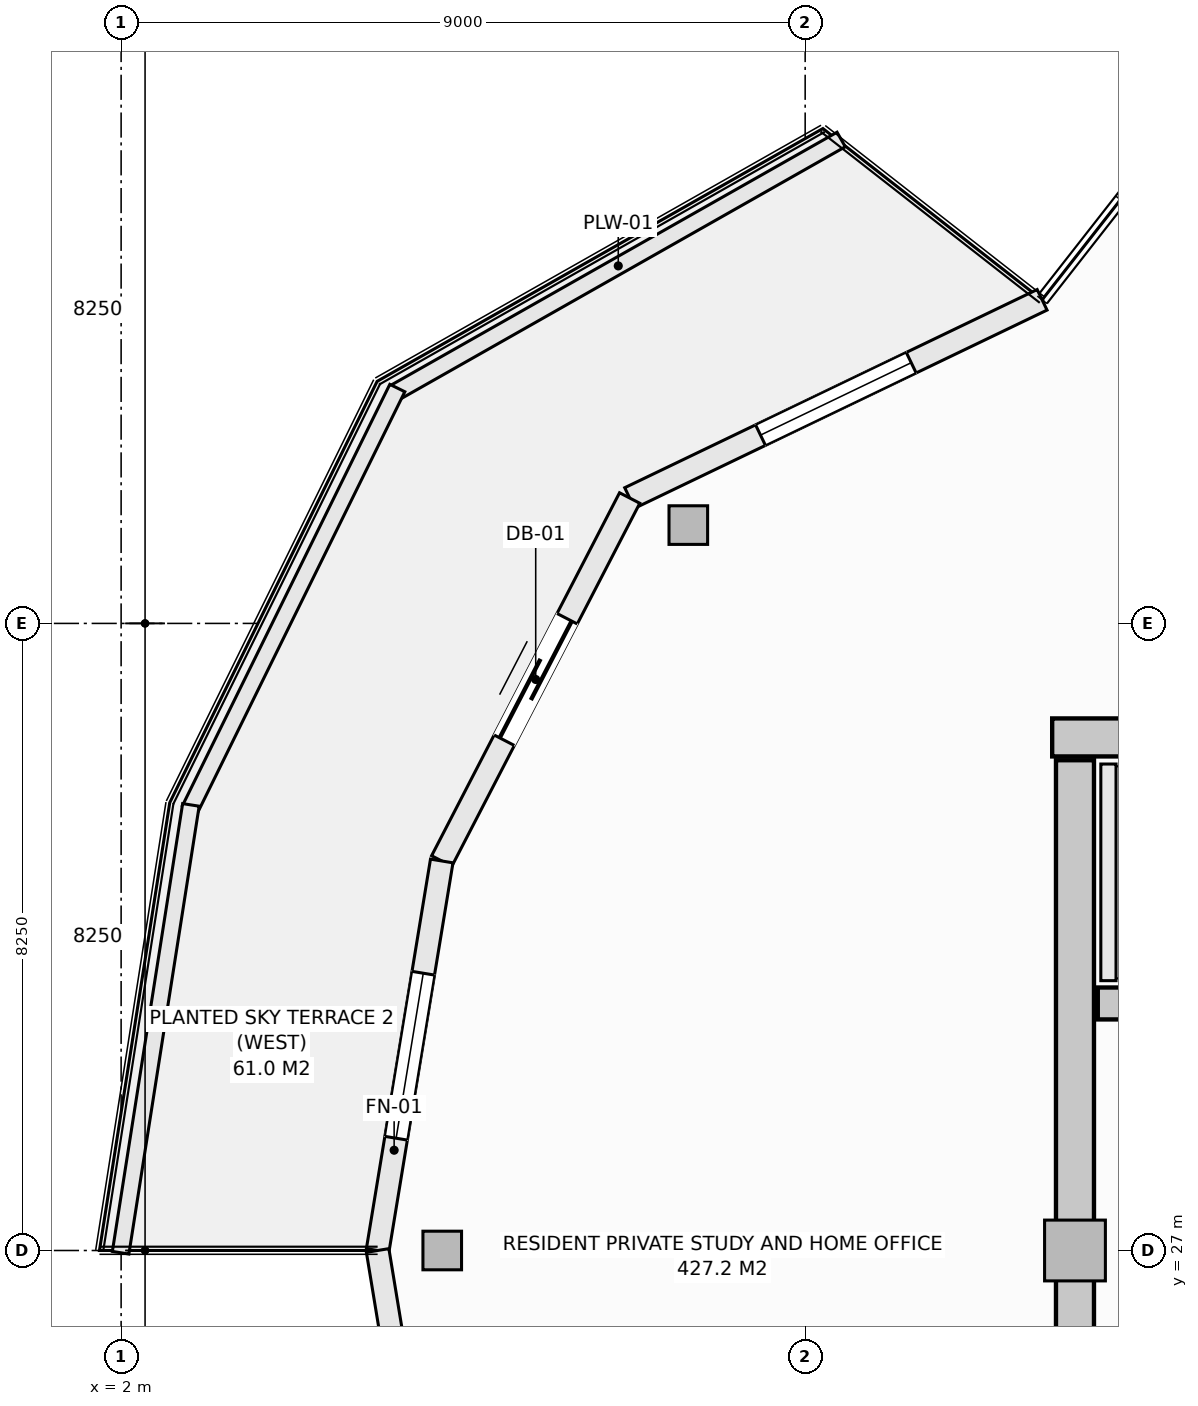
"""IFC4 building model, lengths in metres.
Left out: names, types, materials, properties, quantities, classifications, styles, units other than length and angle.
Written with IfcOpenShell. Run it as: python <this file> out.ifc"""

import sys

from ifc_helpers import new_model, si_unit, direction, frame, frame_2d, origin, origin_2d, place, context, subcontext, project, spatial, rectangle, hollow_rectangle, extrude, element, fill, save


model = new_model("IFC4")
c1 = context("Model", 3, precision=1e-05, world=origin(), true_north=direction((0.0, 1.0)))
c2 = subcontext(c1, "Body", "Model", "MODEL_VIEW")
j1 = project(units=[si_unit("LENGTHUNIT", "METRE"), si_unit("PLANEANGLEUNIT", "RADIAN")], contexts=[c1])
p1 = place(None, origin())
s1 = spatial("IfcSite", under=j1, at=p1, CompositionType="ELEMENT")
p2 = place(p1, origin())
s2 = spatial("IfcBuilding", under=s1, at=p2, CompositionType="ELEMENT")
p3 = place(p2, frame((0.0, 0.0, 199.7)))
s3 = spatial("IfcBuildingStorey", under=s2, at=p3, CompositionType="ELEMENT", Elevation=199.7)
p4 = place(p3, frame((14.25, 33.75, -0.27), z_axis=(0.0, 0.0, 1.0), x_axis=(1.0, 0.0, 0.0)))
e1 = element("IfcWall", 1, at=p4, inside=s3, PredefinedType="SHEAR", context=c2, shape_type="SweptSolid", body=[
    extrude(rectangle(XDim=13.5, YDim=0.5, at=frame_2d((6.75, 0.0))), origin(), (0.0, 0.0, 1.0), 3.3),
])
p5 = place(p3, frame((14.55, 20.55, -0.27), z_axis=(0.0, 0.0, 1.0), x_axis=(0.0, 1.0, 0.0)))
e2 = element("IfcWall", 2, at=p5, inside=s3, PredefinedType="SHEAR", context=c2, shape_type="SweptSolid", body=[
    extrude(rectangle(XDim=12.9, YDim=0.5, at=frame_2d((6.45, 0.0))), origin(), (0.0, 0.0, 1.0), 3.3),
])
p6 = place(p3, frame((14.85, 30.25, -0.27), z_axis=(0.0, 0.0, 1.0), x_axis=(1.0, 0.0, 0.0)))
e3 = element("IfcWall", 3, at=p6, inside=s3, PredefinedType="SHEAR", context=c2, shape_type="SweptSolid", body=[
    extrude(rectangle(XDim=7.3, YDim=0.42, at=frame_2d((3.65, 0.0))), origin(), (0.0, 0.0, 1.0), 3.3),
])
for number, where, z_axis, x_axis in (
    (4, (9.463, 36.544, -0.27), (0.0, 0.0, 1.0), (1.0, 0.0, 0.0)),
    (5, (6.225, 27.0, -0.27), (0.0, 0.0, 1.0), (1.0, 0.0, 0.0)),
):
    element("IfcColumn", number, at=place(p3, frame(where, z_axis=z_axis, x_axis=x_axis)), inside=s3, PredefinedType="COLUMN", context=c2, shape_type="SweptSolid", body=[
        extrude(hollow_rectangle(XDim=0.508, YDim=0.508, WallThickness=0.019, at=origin_2d()), origin(), (0.0, 0.0, 1.0), 3.3),
    ])
p7 = place(p3, frame((14.55, 27.0, -0.27), z_axis=(0.0, 0.0, 1.0), x_axis=(1.0, 0.0, 0.0)))
e6 = element("IfcColumn", 6, at=p7, inside=s3, PredefinedType="PILASTER", context=c2, shape_type="SweptSolid", body=[
    extrude(rectangle(XDim=0.8, YDim=0.8, at=origin_2d()), origin(), (0.0, 0.0, 1.0), 3.3),
])
p8 = place(p3, frame((8.691, 36.9, 0.0), z_axis=(0.0, 0.0, 1.0), x_axis=(0.901348331142, 0.433094892545, 0.0)))
e7 = element("IfcWall", 7, at=p8, inside=s3, PredefinedType="SOLIDWALL", context=c2, shape_type="SweptSolid", body=[
    extrude(rectangle(XDim=6.021, YDim=0.3, at=frame_2d((3.01, 0.0))), origin(), (0.0, 0.0, 1.0), 2.605),
])
p9 = place(p8, frame((1.91, 0.0, 0.72)))
e8 = element("IfcOpeningElement", 8, at=p9, cuts=e7, PredefinedType="OPENING", context=c2, shape_type="SweptSolid", body=[
    extrude(rectangle(XDim=2.2, YDim=1.65, at=frame_2d((1.1, 0.825))), frame((0.0, 0.16, 0.0), z_axis=(0.0, -1.0, 0.0), x_axis=(1.0, 0.0, 0.0)), (0.0, 0.0, 1.0), 0.32),
])
p10 = place(p3, frame((6.218, 32.125, 0.0), z_axis=(0.0, 0.0, 1.0), x_axis=(0.459808219482, 0.888018243786, 0.0)))
e9 = element("IfcWall", 9, at=p10, inside=s3, PredefinedType="SOLIDWALL", context=c2, shape_type="SweptSolid", body=[
    extrude(rectangle(XDim=5.378, YDim=0.3, at=frame_2d((2.689, 0.0))), origin(), (0.0, 0.0, 1.0), 2.605),
])
p11 = place(p10, frame((1.789, 0.0, 0.0)))
e10 = element("IfcOpeningElement", 10, at=p11, cuts=e9, PredefinedType="OPENING", context=c2, shape_type="SweptSolid", body=[
    extrude(rectangle(XDim=1.8, YDim=2.25, at=frame_2d((0.9, 1.125))), frame((0.0, 0.16, 0.0), z_axis=(0.0, -1.0, 0.0), x_axis=(1.0, 0.0, 0.0)), (0.0, 0.0, 1.0), 0.32),
])
p12 = place(p3, frame((5.375, 27.0, 0.0), z_axis=(0.0, 0.0, 1.0), x_axis=(0.16237087798, 0.986729799886, 0.0)))
e11 = element("IfcWall", 11, at=p12, inside=s3, PredefinedType="SOLIDWALL", context=c2, shape_type="SweptSolid", body=[
    extrude(rectangle(XDim=5.193, YDim=0.3, at=frame_2d((2.597, 0.0))), origin(), (0.0, 0.0, 1.0), 2.605),
])
p13 = place(p12, frame((1.497, 0.0, 0.72)))
e12 = element("IfcOpeningElement", 12, at=p13, cuts=e11, PredefinedType="OPENING", context=c2, shape_type="SweptSolid", body=[
    extrude(rectangle(XDim=2.2, YDim=1.65, at=frame_2d((1.1, 0.825))), frame((0.0, 0.16, 0.0), z_axis=(0.0, -1.0, 0.0), x_axis=(1.0, 0.0, 0.0)), (0.0, 0.0, 1.0), 0.32),
])
p14 = place(p3, frame((5.375, 27.0, 0.0), z_axis=(0.0, 0.0, 1.0), x_axis=(0.16237087798, -0.986729799886, 0.0)))
e13 = element("IfcWall", 13, at=p14, inside=s3, PredefinedType="SOLIDWALL", context=c2, shape_type="SweptSolid", body=[
    extrude(rectangle(XDim=5.193, YDim=0.3, at=frame_2d((2.597, 0.0))), origin(), (0.0, 0.0, 1.0), 2.605),
])
p15 = place(p14, frame((1.497, 0.0, 0.72)))
e14 = element("IfcOpeningElement", 14, at=p15, cuts=e13, PredefinedType="OPENING", context=c2, shape_type="SweptSolid", body=[
    extrude(rectangle(XDim=2.2, YDim=1.65, at=frame_2d((1.1, 0.825))), frame((0.0, 0.16, 0.0), z_axis=(0.0, -1.0, 0.0), x_axis=(1.0, 0.0, 0.0)), (0.0, 0.0, 1.0), 0.32),
])
p16 = place(p3, frame((5.608, 38.291, 0.0), z_axis=(0.0, 0.0, 1.0), x_axis=(0.869860619267, 0.493297580623, 0.0)))
e15 = element("IfcWall", 15, at=p16, inside=s3, PredefinedType="PARAPET", context=c2, shape_type="SweptSolid", body=[
    extrude(rectangle(XDim=6.743, YDim=0.22, at=frame_2d((3.371, 0.0))), origin(), (0.0, 0.0, 1.0), 0.52),
])
p17 = place(p3, frame((2.906, 32.804, 0.0), z_axis=(0.0, 0.0, 1.0), x_axis=(0.441640961804, 0.897191875162, 0.0)))
e16 = element("IfcWall", 16, at=p17, inside=s3, PredefinedType="PARAPET", context=c2, shape_type="SweptSolid", body=[
    extrude(rectangle(XDim=6.178, YDim=0.22, at=frame_2d((3.089, 0.0))), origin(), (0.0, 0.0, 1.0), 0.52),
])
p18 = place(p3, frame((1.993, 26.971, 0.0), z_axis=(0.0, 0.0, 1.0), x_axis=(0.1550711793, 0.987903299595, 0.0)))
e17 = element("IfcWall", 17, at=p18, inside=s3, PredefinedType="PARAPET", context=c2, shape_type="SweptSolid", body=[
    extrude(rectangle(XDim=5.964, YDim=0.22, at=frame_2d((2.982, 0.0))), origin(), (0.0, 0.0, 1.0), 0.52),
])
p19 = place(p3, frame((14.99, 30.55, 0.0), z_axis=(0.0, 0.0, 1.0), x_axis=(0.0, 1.0, 0.0)))
e18 = element("IfcWall", 18, at=p19, inside=s3, PredefinedType="SOLIDWALL", context=c2, shape_type="SweptSolid", body=[
    extrude(rectangle(XDim=2.85, YDim=0.2, at=frame_2d((1.425, 0.0))), origin(), (0.0, 0.0, 1.0), 3.03),
])
p20 = place(p9, origin())
e19 = element("IfcWindow", 19, at=p20, inside=s3, PartitioningType="SINGLE_PANEL", PredefinedType="WINDOW", context=c2, shape_type="SweptSolid", body=[
    extrude(rectangle(XDim=2.2, YDim=1.65, at=frame_2d((1.1, 0.825))), frame((0.0, 0.03, 0.0), z_axis=(0.0, -1.0, 0.0), x_axis=(1.0, 0.0, 0.0)), (0.0, 0.0, 1.0), 0.06),
])
fill(e8, e19)
p21 = place(p11, origin())
e20 = element("IfcDoor", 20, at=p21, inside=s3, OperationType="SLIDING_TO_LEFT", PredefinedType="DOOR", context=c2, shape_type="SweptSolid", body=[
    extrude(rectangle(XDim=1.8, YDim=2.25, at=frame_2d((0.9, 1.125))), frame((0.0, 0.025, 0.0), z_axis=(0.0, -1.0, 0.0), x_axis=(1.0, 0.0, 0.0)), (0.0, 0.0, 1.0), 0.05),
])
fill(e10, e20)
p22 = place(p13, origin())
e21 = element("IfcWindow", 21, at=p22, inside=s3, PartitioningType="SINGLE_PANEL", PredefinedType="WINDOW", context=c2, shape_type="SweptSolid", body=[
    extrude(rectangle(XDim=2.2, YDim=1.65, at=frame_2d((1.1, 0.825))), frame((0.0, 0.03, 0.0), z_axis=(0.0, -1.0, 0.0), x_axis=(1.0, 0.0, 0.0)), (0.0, 0.0, 1.0), 0.06),
])
fill(e12, e21)
save(model, sys.argv[1])
